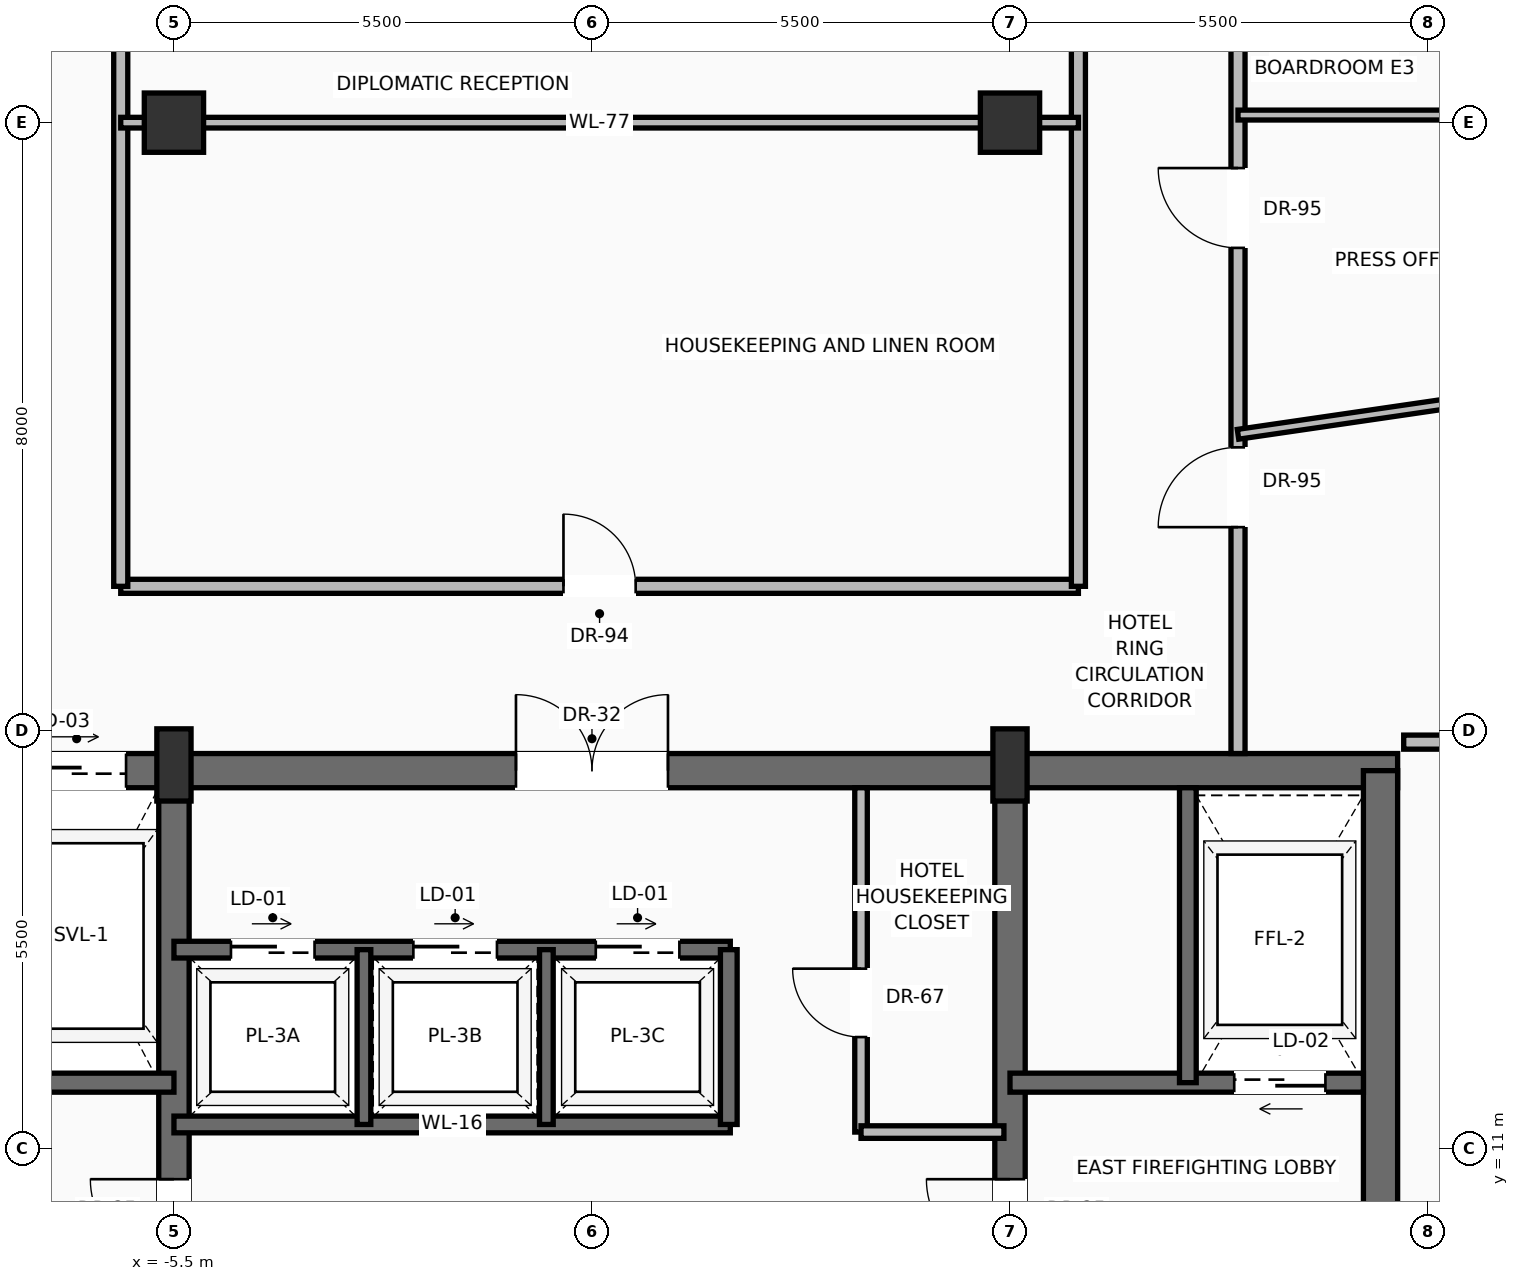
"""IFC4 building model, lengths in metres.
Left out: names, types, materials, properties, quantities, classifications, styles, units other than length and angle.
Written with IfcOpenShell. Run it as: python <this file> out.ifc"""

import sys

from ifc_helpers import new_model, si_unit, direction, frame, frame_2d, origin, origin_2d, place, context, subcontext, project, spatial, rectangle, extrude, source, transform, mapped, element, fill, save


model = new_model("IFC4")
c1 = context("Model", 3, precision=1e-05, world=origin(), true_north=direction((0.0, 1.0)))
c2 = subcontext(c1, "Body", "Model", "MODEL_VIEW")
j1 = project(units=[si_unit("LENGTHUNIT", "METRE"), si_unit("PLANEANGLEUNIT", "RADIAN")], contexts=[c1])
p1 = place(None, origin())
s1 = spatial("IfcSite", under=j1, at=p1, CompositionType="ELEMENT")
p2 = place(p1, origin())
s2 = spatial("IfcBuilding", under=s1, at=p2, CompositionType="ELEMENT")
p3 = place(p2, frame((0.0, 0.0, 262.65)))
s3 = spatial("IfcBuildingStorey", under=s2, at=p3, CompositionType="ELEMENT", Elevation=262.65)
p4 = place(p3, frame((-10.6, 15.975, 0.0), z_axis=(0.0, 0.0, 1.0), x_axis=(1.0, 0.0, 0.0)))
e1 = element("IfcWall", 1, at=p4, inside=s3, PredefinedType="SHEAR", context=c2, shape_type="SweptSolid", body=[
    extrude(rectangle(XDim=21.2, YDim=0.45, at=frame_2d((10.6, 0.0))), origin(), (0.0, 0.0, 1.0), 3.24),
])
p5 = place(p4, frame((3.17, 0.0, 0.0)))
e2 = element("IfcOpeningElement", 2, at=p5, cuts=e1, PredefinedType="OPENING", context=c2, shape_type="SweptSolid", body=[
    extrude(rectangle(XDim=1.3, YDim=2.3, at=frame_2d((0.65, 1.15))), frame((0.0, 0.235, 0.0), z_axis=(0.0, -1.0, 0.0), x_axis=(1.0, 0.0, 0.0)), (0.0, 0.0, 1.0), 0.47),
])
p6 = place(p4, frame((9.6, 0.0, 0.0)))
e3 = element("IfcOpeningElement", 3, at=p6, cuts=e1, PredefinedType="OPENING", context=c2, shape_type="SweptSolid", body=[
    extrude(rectangle(XDim=2.0, YDim=2.4, at=frame_2d((1.0, 1.2))), frame((0.0, 0.235, 0.0), z_axis=(0.0, -1.0, 0.0), x_axis=(1.0, 0.0, 0.0)), (0.0, 0.0, 1.0), 0.47),
])
p7 = place(p3, frame((10.375, 0.625, 0.0), z_axis=(0.0, 0.0, 1.0), x_axis=(0.0, 1.0, 0.0)))
e4 = element("IfcWall", 4, at=p7, inside=s3, PredefinedType="SHEAR", context=c2, shape_type="SweptSolid", body=[
    extrude(rectangle(XDim=15.35, YDim=0.45, at=frame_2d((7.675, 0.0))), origin(), (0.0, 0.0, 1.0), 3.24),
])
p8 = place(p3, frame((-5.5, 0.625, 0.0), z_axis=(0.0, 0.0, 1.0), x_axis=(0.0, 1.0, 0.0)))
e5 = element("IfcWall", 5, at=p8, inside=s3, PredefinedType="SHEAR", context=c2, shape_type="SweptSolid", body=[
    extrude(rectangle(XDim=15.35, YDim=0.4, at=frame_2d((7.675, 0.0))), origin(), (0.0, 0.0, 1.0), 3.24),
])
p9 = place(p8, frame((8.875, 0.0, 0.0)))
e6 = element("IfcOpeningElement", 6, at=p9, cuts=e5, PredefinedType="OPENING", context=c2, shape_type="SweptSolid", body=[
    extrude(rectangle(XDim=1.1, YDim=2.2, at=frame_2d((0.55, 1.1))), frame((0.0, 0.21, 0.0), z_axis=(0.0, -1.0, 0.0), x_axis=(1.0, 0.0, 0.0)), (0.0, 0.0, 1.0), 0.42),
])
p10 = place(p3, frame((5.5, 0.625, 0.0), z_axis=(0.0, 0.0, 1.0), x_axis=(0.0, 1.0, 0.0)))
e7 = element("IfcWall", 7, at=p10, inside=s3, PredefinedType="SHEAR", context=c2, shape_type="SweptSolid", body=[
    extrude(rectangle(XDim=15.35, YDim=0.4, at=frame_2d((7.675, 0.0))), origin(), (0.0, 0.0, 1.0), 3.24),
])
p11 = place(p10, frame((8.875, 0.0, 0.0)))
e8 = element("IfcOpeningElement", 8, at=p11, cuts=e7, PredefinedType="OPENING", context=c2, shape_type="SweptSolid", body=[
    extrude(rectangle(XDim=1.1, YDim=2.2, at=frame_2d((0.55, 1.1))), frame((0.0, 0.21, 0.0), z_axis=(0.0, -1.0, 0.0), x_axis=(1.0, 0.0, 0.0)), (0.0, 0.0, 1.0), 0.42),
])
m1 = source(origin(), c2, "Body", "SweptSolid", [
    extrude(rectangle(XDim=0.45, YDim=0.95, at=origin_2d()), origin(), (0.0, 0.0, 1.0), 3.45),
])
for number, where, z_axis, x_axis in (
    (9, (-5.5, 16.05, 0.0), (0.0, 0.0, 1.0), (1.0, 0.0, 0.0)),
    (10, (5.5, 16.05, 0.0), (0.0, 0.0, 1.0), (1.0, 0.0, 0.0)),
):
    element("IfcColumn", number, at=place(p3, frame(where, z_axis=z_axis, x_axis=x_axis)), inside=s3, PredefinedType="PILASTER", context=c2, shape_type="MappedRepresentation", body=[
        mapped(m1, transform((0.0, 0.0, 0.0), scale=1.0)),
    ])
m2 = source(origin(), c2, "Body", "SweptSolid", [
    extrude(rectangle(XDim=0.78, YDim=0.78, at=origin_2d()), origin(), (0.0, 0.0, 1.0), 3.45),
])
for number, where, z_axis, x_axis in (
    (11, (-5.5, 24.5, 0.0), (0.0, 0.0, 1.0), (1.0, 0.0, 0.0)),
    (12, (5.5, 24.5, 0.0), (0.0, 0.0, 1.0), (1.0, 0.0, 0.0)),
):
    element("IfcColumn", number, at=place(p3, frame(where, z_axis=z_axis, x_axis=x_axis)), inside=s3, PredefinedType="COLUMN", context=c2, shape_type="MappedRepresentation", body=[
        mapped(m2, transform((0.0, 0.0, 0.0), scale=1.0)),
    ])
p12 = place(p3, frame((8.051, 31.865, 0.0), z_axis=(0.0, 0.0, 1.0), x_axis=(0.516203649231, -0.856465873529, 0.0)))
e13 = element("IfcWall", 13, at=p12, inside=s3, PredefinedType="SOLIDWALL", context=c2, shape_type="SweptSolid", body=[
    extrude(rectangle(XDim=19.896, YDim=0.28, at=frame_2d((9.948, 0.0))), origin(), (0.0, 0.0, 1.0), 2.82),
])
p13 = place(p12, frame((4.775, 0.0, 0.0)))
e14 = element("IfcOpeningElement", 14, at=p13, cuts=e13, PredefinedType="OPENING", context=c2, shape_type="SweptSolid", body=[
    extrude(rectangle(XDim=1.6, YDim=2.35, at=frame_2d((0.8, 1.175))), frame((0.0, 0.15, 0.0), z_axis=(0.0, -1.0, 0.0), x_axis=(1.0, 0.0, 0.0)), (0.0, 0.0, 1.0), 0.3),
])
p14 = place(p12, frame((13.529, 0.0, 0.9)))
e15 = element("IfcOpeningElement", 15, at=p14, cuts=e13, PredefinedType="OPENING", context=c2, shape_type="SweptSolid", body=[
    extrude(rectangle(XDim=2.0, YDim=1.75, at=frame_2d((1.0, 0.875))), frame((0.0, 0.15, 0.0), z_axis=(0.0, -1.0, 0.0), x_axis=(1.0, 0.0, 0.0)), (0.0, 0.0, 1.0), 0.3),
])
p15 = place(p3, frame((-5.5, 11.87, 0.0), z_axis=(0.0, 0.0, 1.0), x_axis=(-1.0, 0.0, 0.0)))
e16 = element("IfcWall", 16, at=p15, inside=s3, PredefinedType="SOLIDWALL", context=c2, shape_type="SweptSolid", body=[
    extrude(rectangle(XDim=4.65, YDim=0.25, at=frame_2d((2.325, 0.0))), origin(), (0.0, 0.0, 1.0), 3.24),
])
p16 = place(p15, frame((2.95, 0.0, 0.0)))
e17 = element("IfcOpeningElement", 17, at=p16, cuts=e16, PredefinedType="OPENING", context=c2, shape_type="SweptSolid", body=[
    extrude(rectangle(XDim=1.2, YDim=2.25, at=frame_2d((0.6, 1.125))), frame((0.0, 0.135, 0.0), z_axis=(0.0, -1.0, 0.0), x_axis=(1.0, 0.0, 0.0)), (0.0, 0.0, 1.0), 0.27),
])
p17 = place(p3, frame((10.15, 11.87, 0.0), z_axis=(0.0, 0.0, 1.0), x_axis=(-1.0, 0.0, 0.0)))
e18 = element("IfcWall", 18, at=p17, inside=s3, PredefinedType="SOLIDWALL", context=c2, shape_type="SweptSolid", body=[
    extrude(rectangle(XDim=4.65, YDim=0.25, at=frame_2d((2.325, 0.0))), origin(), (0.0, 0.0, 1.0), 3.24),
])
p18 = place(p17, frame((0.5, 0.0, 0.0)))
e19 = element("IfcOpeningElement", 19, at=p18, cuts=e18, PredefinedType="OPENING", context=c2, shape_type="SweptSolid", body=[
    extrude(rectangle(XDim=1.2, YDim=2.25, at=frame_2d((0.6, 1.125))), frame((0.0, 0.135, 0.0), z_axis=(0.0, -1.0, 0.0), x_axis=(1.0, 0.0, 0.0)), (0.0, 0.0, 1.0), 0.27),
])
p19 = place(p3, frame((7.84, 11.87, 0.0), z_axis=(0.0, 0.0, 1.0), x_axis=(0.0, 1.0, 0.0)))
e20 = element("IfcWall", 20, at=p19, inside=s3, PredefinedType="SOLIDWALL", context=c2, shape_type="SweptSolid", body=[
    extrude(rectangle(XDim=3.88, YDim=0.22, at=frame_2d((1.94, 0.0))), origin(), (0.0, 0.0, 1.0), 3.24),
])
p20 = place(p3, frame((-5.5, 11.32, 0.0), z_axis=(0.0, 0.0, 1.0), x_axis=(1.0, 0.0, 0.0)))
e21 = element("IfcWall", 21, at=p20, inside=s3, PredefinedType="SOLIDWALL", context=c2, shape_type="SweptSolid", body=[
    extrude(rectangle(XDim=7.32, YDim=0.22, at=frame_2d((3.66, 0.0))), origin(), (0.0, 0.0, 1.0), 3.24),
])
p21 = place(p3, frame((-5.5, 13.62, 0.0), z_axis=(0.0, 0.0, 1.0), x_axis=(1.0, 0.0, 0.0)))
e22 = element("IfcWall", 22, at=p21, inside=s3, PredefinedType="SOLIDWALL", context=c2, shape_type="SweptSolid", body=[
    extrude(rectangle(XDim=7.32, YDim=0.22, at=frame_2d((3.66, 0.0))), origin(), (0.0, 0.0, 1.0), 3.24),
])
p22 = place(p21, frame((0.75, 0.0, 0.0)))
e23 = element("IfcOpeningElement", 23, at=p22, cuts=e22, PredefinedType="OPENING", context=c2, shape_type="SweptSolid", body=[
    extrude(rectangle(XDim=1.1, YDim=2.2, at=frame_2d((0.55, 1.1))), frame((0.0, 0.12, 0.0), z_axis=(0.0, -1.0, 0.0), x_axis=(1.0, 0.0, 0.0)), (0.0, 0.0, 1.0), 0.24),
])
p23 = place(p21, frame((3.15, 0.0, 0.0)))
e24 = element("IfcOpeningElement", 24, at=p23, cuts=e22, PredefinedType="OPENING", context=c2, shape_type="SweptSolid", body=[
    extrude(rectangle(XDim=1.1, YDim=2.2, at=frame_2d((0.55, 1.1))), frame((0.0, 0.12, 0.0), z_axis=(0.0, -1.0, 0.0), x_axis=(1.0, 0.0, 0.0)), (0.0, 0.0, 1.0), 0.24),
])
p24 = place(p21, frame((5.55, 0.0, 0.0)))
e25 = element("IfcOpeningElement", 25, at=p24, cuts=e22, PredefinedType="OPENING", context=c2, shape_type="SweptSolid", body=[
    extrude(rectangle(XDim=1.1, YDim=2.2, at=frame_2d((0.55, 1.1))), frame((0.0, 0.12, 0.0), z_axis=(0.0, -1.0, 0.0), x_axis=(1.0, 0.0, 0.0)), (0.0, 0.0, 1.0), 0.24),
])
p25 = place(p3, frame((1.8, 11.32, 0.0), z_axis=(0.0, 0.0, 1.0), x_axis=(0.0, 1.0, 0.0)))
e26 = element("IfcWall", 26, at=p25, inside=s3, PredefinedType="SOLIDWALL", context=c2, shape_type="SweptSolid", body=[
    extrude(rectangle(XDim=2.3, YDim=0.22, at=frame_2d((1.15, 0.0))), origin(), (0.0, 0.0, 1.0), 3.24),
])
for number, where, z_axis, x_axis in (
    (27, (-3.0, 11.32, 0.0), (0.0, 0.0, 1.0), (0.0, 1.0, 0.0)),
    (28, (-0.6, 11.32, 0.0), (0.0, 0.0, 1.0), (0.0, 1.0, 0.0)),
):
    element("IfcWall", number, at=place(p3, frame(where, z_axis=z_axis, x_axis=x_axis)), inside=s3, PredefinedType="SOLIDWALL", context=c2, shape_type="SweptSolid", body=[
        extrude(rectangle(XDim=2.3, YDim=0.18, at=frame_2d((1.15, 0.0))), origin(), (0.0, 0.0, 1.0), 3.24),
    ])
p26 = place(p3, frame((3.54, 11.22, 0.0), z_axis=(0.0, 0.0, 1.0), x_axis=(0.0, 1.0, 0.0)))
e29 = element("IfcWall", 29, at=p26, inside=s3, PredefinedType="PARTITIONING", context=c2, shape_type="SweptSolid", body=[
    extrude(rectangle(XDim=4.53, YDim=0.165, at=frame_2d((2.265, 0.0))), origin(), (0.0, 0.0, 1.0), 3.232),
])
p27 = place(p26, frame((1.25, 0.0, 0.0)))
e30 = element("IfcOpeningElement", 30, at=p27, cuts=e29, PredefinedType="OPENING", context=c2, shape_type="SweptSolid", body=[
    extrude(rectangle(XDim=0.9, YDim=2.1, at=frame_2d((0.45, 1.05))), frame((0.0, 0.093, 0.0), z_axis=(0.0, -1.0, 0.0), x_axis=(1.0, 0.0, 0.0)), (0.0, 0.0, 1.0), 0.185),
])
p28 = place(p3, frame((3.54, 11.22, 0.0), z_axis=(0.0, 0.0, 1.0), x_axis=(1.0, 0.0, 0.0)))
e31 = element("IfcWall", 31, at=p28, inside=s3, PredefinedType="PARTITIONING", context=c2, shape_type="SweptSolid", body=[
    extrude(rectangle(XDim=1.88, YDim=0.165, at=frame_2d((0.94, 0.0))), origin(), (0.0, 0.0, 1.0), 3.232),
])
p29 = place(p3, frame((-6.2, 18.4, 0.0), z_axis=(0.0, 0.0, 1.0), x_axis=(1.0, 0.0, 0.0)))
e32 = element("IfcWall", 32, at=p29, inside=s3, PredefinedType="PARTITIONING", context=c2, shape_type="SweptSolid", body=[
    extrude(rectangle(XDim=12.6, YDim=0.185, at=frame_2d((6.3, 0.0))), origin(), (0.0, 0.0, 1.0), 3.232),
])
p30 = place(p29, frame((5.825, 0.0, 0.0)))
e33 = element("IfcOpeningElement", 33, at=p30, cuts=e32, PredefinedType="OPENING", context=c2, shape_type="SweptSolid", body=[
    extrude(rectangle(XDim=0.95, YDim=2.2, at=frame_2d((0.475, 1.1))), frame((0.0, 0.103, 0.0), z_axis=(0.0, -1.0, 0.0), x_axis=(1.0, 0.0, 0.0)), (0.0, 0.0, 1.0), 0.205),
])
for number, where, z_axis, x_axis in (
    (34, (-6.2, 18.4, 0.0), (0.0, 0.0, 1.0), (0.0, 1.0, 0.0)),
    (35, (6.4, 18.4, 0.0), (0.0, 0.0, 1.0), (0.0, 1.0, 0.0)),
):
    element("IfcWall", number, at=place(p3, frame(where, z_axis=z_axis, x_axis=x_axis)), inside=s3, PredefinedType="PARTITIONING", context=c2, shape_type="SweptSolid", body=[
        extrude(rectangle(XDim=7.9, YDim=0.185, at=frame_2d((3.95, 0.0))), origin(), (0.0, 0.0, 1.0), 3.232),
    ])
p31 = place(p3, frame((8.5, 16.2, 0.0), z_axis=(0.0, 0.0, 1.0), x_axis=(0.0, 1.0, 0.0)))
e36 = element("IfcWall", 36, at=p31, inside=s3, PredefinedType="PARTITIONING", context=c2, shape_type="SweptSolid", body=[
    extrude(rectangle(XDim=12.2, YDim=0.185, at=frame_2d((6.1, 0.0))), origin(), (0.0, 0.0, 1.0), 3.232),
])
p32 = place(p31, frame((2.978, 0.0, 0.0)))
e37 = element("IfcOpeningElement", 37, at=p32, cuts=e36, PredefinedType="OPENING", context=c2, shape_type="SweptSolid", body=[
    extrude(rectangle(XDim=1.05, YDim=2.25, at=frame_2d((0.525, 1.125))), frame((0.0, 0.103, 0.0), z_axis=(0.0, -1.0, 0.0), x_axis=(1.0, 0.0, 0.0)), (0.0, 0.0, 1.0), 0.205),
])
p33 = place(p31, frame((6.653, 0.0, 0.0)))
e38 = element("IfcOpeningElement", 38, at=p33, cuts=e36, PredefinedType="OPENING", context=c2, shape_type="SweptSolid", body=[
    extrude(rectangle(XDim=1.05, YDim=2.25, at=frame_2d((0.525, 1.125))), frame((0.0, 0.103, 0.0), z_axis=(0.0, -1.0, 0.0), x_axis=(1.0, 0.0, 0.0)), (0.0, 0.0, 1.0), 0.205),
])
p34 = place(p31, frame((9.953, 0.0, 0.0)))
e39 = element("IfcOpeningElement", 39, at=p34, cuts=e36, PredefinedType="OPENING", context=c2, shape_type="SweptSolid", body=[
    extrude(rectangle(XDim=1.05, YDim=2.25, at=frame_2d((0.525, 1.125))), frame((0.0, 0.103, 0.0), z_axis=(0.0, -1.0, 0.0), x_axis=(1.0, 0.0, 0.0)), (0.0, 0.0, 1.0), 0.205),
])
p35 = place(p3, frame((-6.2, 24.5, 0.0), z_axis=(0.0, 0.0, 1.0), x_axis=(1.0, 0.0, 0.0)))
e40 = element("IfcWall", 40, at=p35, inside=s3, PredefinedType="PARTITIONING", context=c2, shape_type="SweptSolid", body=[
    extrude(rectangle(XDim=12.6, YDim=0.14, at=frame_2d((6.3, 0.0))), origin(), (0.0, 0.0, 1.0), 2.683),
])
p36 = place(p3, frame((10.68, 16.35, 0.0), z_axis=(0.0, 0.0, 1.0), x_axis=(1.0, 0.0, 0.0)))
e41 = element("IfcWall", 41, at=p36, inside=s3, PredefinedType="PARTITIONING", context=c2, shape_type="SweptSolid", body=[
    extrude(rectangle(XDim=6.874, YDim=0.185, at=frame_2d((3.437, 0.0))), origin(), (0.0, 0.0, 1.0), 3.232),
])
p37 = place(p36, frame((1.983, 0.0, 0.0)))
e42 = element("IfcOpeningElement", 42, at=p37, cuts=e41, PredefinedType="OPENING", context=c2, shape_type="SweptSolid", body=[
    extrude(rectangle(XDim=1.05, YDim=2.25, at=frame_2d((0.525, 1.125))), frame((0.0, 0.103, 0.0), z_axis=(0.0, -1.0, 0.0), x_axis=(1.0, 0.0, 0.0)), (0.0, 0.0, 1.0), 0.205),
])
p38 = place(p3, frame((8.5, 20.4, 0.0), z_axis=(0.0, 0.0, 1.0), x_axis=(0.989507543015, 0.144481217869, 0.0)))
e43 = element("IfcWall", 43, at=p38, inside=s3, PredefinedType="PARTITIONING", context=c2, shape_type="SweptSolid", body=[
    extrude(rectangle(XDim=6.142, YDim=0.13, at=frame_2d((3.071, 0.0))), origin(), (0.0, 0.0, 1.0), 3.232),
])
p39 = place(p3, frame((8.5, 24.6, 0.0), z_axis=(0.0, 0.0, 1.0), x_axis=(1.0, 0.0, 0.0)))
e44 = element("IfcWall", 44, at=p39, inside=s3, PredefinedType="PARTITIONING", context=c2, shape_type="SweptSolid", body=[
    extrude(rectangle(XDim=4.081, YDim=0.13, at=frame_2d((2.041, 0.0))), origin(), (0.0, 0.0, 1.0), 2.683),
])
m3 = source(origin(), c2, "Body", "SweptSolid", [
    extrude(rectangle(XDim=1.1, YDim=2.2, at=frame_2d((0.55, 1.1))), frame((0.0, 0.025, 0.0), z_axis=(0.0, -1.0, 0.0), x_axis=(1.0, 0.0, 0.0)), (0.0, 0.0, 1.0), 0.05),
])
p40 = place(p9, origin())
e45 = element("IfcDoor", 45, at=p40, inside=s3, OperationType="SINGLE_SWING_RIGHT", PredefinedType="DOOR", context=c2, shape_type="MappedRepresentation", body=[
    mapped(m3, transform((0.0, 0.0, 0.0), scale=1.0)),
])
fill(e6, e45)
m4 = source(origin(), c2, "Body", "SweptSolid", [
    extrude(rectangle(XDim=1.3, YDim=2.3, at=frame_2d((0.65, 1.15))), frame((0.0, 0.025, 0.0), z_axis=(0.0, -1.0, 0.0), x_axis=(1.0, 0.0, 0.0)), (0.0, 0.0, 1.0), 0.05),
])
p41 = place(p5, origin())
e46 = element("IfcDoor", 46, at=p41, inside=s3, OperationType="SLIDING_TO_RIGHT", PredefinedType="DOOR", context=c2, shape_type="MappedRepresentation", body=[
    mapped(m4, transform((0.0, 0.0, 0.0), scale=1.0)),
])
fill(e2, e46)
p42 = place(p11, origin())
e47 = element("IfcDoor", 47, at=p42, inside=s3, OperationType="SINGLE_SWING_RIGHT", PredefinedType="DOOR", context=c2, shape_type="MappedRepresentation", body=[
    mapped(m3, transform((0.0, 0.0, 0.0), scale=1.0)),
])
fill(e8, e47)
m5 = source(origin(), c2, "Body", "SweptSolid", [
    extrude(rectangle(XDim=1.2, YDim=2.25, at=frame_2d((0.6, 1.125))), frame((0.0, 0.025, 0.0), z_axis=(0.0, -1.0, 0.0), x_axis=(1.0, 0.0, 0.0)), (0.0, 0.0, 1.0), 0.05),
])
p43 = place(p18, origin())
e48 = element("IfcDoor", 48, at=p43, inside=s3, OperationType="SLIDING_TO_RIGHT", PredefinedType="DOOR", context=c2, shape_type="MappedRepresentation", body=[
    mapped(m5, transform((0.0, 0.0, 0.0), scale=1.0)),
])
fill(e19, e48)
m6 = source(origin(), c2, "Body", "SweptSolid", [
    extrude(rectangle(XDim=2.0, YDim=2.4, at=frame_2d((1.0, 1.2))), frame((0.0, 0.025, 0.0), z_axis=(0.0, -1.0, 0.0), x_axis=(1.0, 0.0, 0.0)), (0.0, 0.0, 1.0), 0.05),
])
p44 = place(p6, origin())
e49 = element("IfcDoor", 49, at=p44, inside=s3, OperationType="DOUBLE_DOOR_SINGLE_SWING", PredefinedType="DOOR", context=c2, shape_type="MappedRepresentation", body=[
    mapped(m6, transform((0.0, 0.0, 0.0), scale=1.0)),
])
fill(e3, e49)
m7 = source(origin(), c2, "Body", "SweptSolid", [
    extrude(rectangle(XDim=1.1, YDim=2.2, at=frame_2d((0.55, 1.1))), frame((0.0, 0.025, 0.0), z_axis=(0.0, -1.0, 0.0), x_axis=(1.0, 0.0, 0.0)), (0.0, 0.0, 1.0), 0.05),
])
p45 = place(p22, origin())
e50 = element("IfcDoor", 50, at=p45, inside=s3, OperationType="SLIDING_TO_RIGHT", PredefinedType="DOOR", context=c2, shape_type="MappedRepresentation", body=[
    mapped(m7, transform((0.0, 0.0, 0.0), scale=1.0)),
])
fill(e23, e50)
p46 = place(p23, origin())
e51 = element("IfcDoor", 51, at=p46, inside=s3, OperationType="SLIDING_TO_RIGHT", PredefinedType="DOOR", context=c2, shape_type="MappedRepresentation", body=[
    mapped(m7, transform((0.0, 0.0, 0.0), scale=1.0)),
])
fill(e24, e51)
p47 = place(p24, origin())
e52 = element("IfcDoor", 52, at=p47, inside=s3, OperationType="SLIDING_TO_RIGHT", PredefinedType="DOOR", context=c2, shape_type="MappedRepresentation", body=[
    mapped(m7, transform((0.0, 0.0, 0.0), scale=1.0)),
])
fill(e25, e52)
m8 = source(origin(), c2, "Body", "SweptSolid", [
    extrude(rectangle(XDim=0.9, YDim=2.1, at=frame_2d((0.45, 1.05))), frame((0.0, 0.025, 0.0), z_axis=(0.0, -1.0, 0.0), x_axis=(1.0, 0.0, 0.0)), (0.0, 0.0, 1.0), 0.05),
])
p48 = place(p27, origin())
e53 = element("IfcDoor", 53, at=p48, inside=s3, OperationType="SINGLE_SWING_RIGHT", PredefinedType="DOOR", context=c2, shape_type="MappedRepresentation", body=[
    mapped(m8, transform((0.0, 0.0, 0.0), scale=1.0)),
])
fill(e30, e53)
m9 = source(origin(), c2, "Body", "SweptSolid", [
    extrude(rectangle(XDim=0.95, YDim=2.2, at=frame_2d((0.475, 1.1))), frame((0.0, 0.025, 0.0), z_axis=(0.0, -1.0, 0.0), x_axis=(1.0, 0.0, 0.0)), (0.0, 0.0, 1.0), 0.05),
])
p49 = place(p30, origin())
e54 = element("IfcDoor", 54, at=p49, inside=s3, OperationType="SINGLE_SWING_LEFT", PredefinedType="DOOR", context=c2, shape_type="MappedRepresentation", body=[
    mapped(m9, transform((0.0, 0.0, 0.0), scale=1.0)),
])
fill(e33, e54)
m10 = source(origin(), c2, "Body", "SweptSolid", [
    extrude(rectangle(XDim=1.05, YDim=2.25, at=frame_2d((0.525, 1.125))), frame((0.0, 0.025, 0.0), z_axis=(0.0, -1.0, 0.0), x_axis=(1.0, 0.0, 0.0)), (0.0, 0.0, 1.0), 0.05),
])
p50 = place(p32, origin())
e55 = element("IfcDoor", 55, at=p50, inside=s3, OperationType="SINGLE_SWING_LEFT", PredefinedType="DOOR", context=c2, shape_type="MappedRepresentation", body=[
    mapped(m10, transform((0.0, 0.0, 0.0), scale=1.0)),
])
fill(e37, e55)
p51 = place(p33, origin())
e56 = element("IfcDoor", 56, at=p51, inside=s3, OperationType="SINGLE_SWING_RIGHT", PredefinedType="DOOR", context=c2, shape_type="MappedRepresentation", body=[
    mapped(m10, transform((0.0, 0.0, 0.0), scale=1.0)),
])
fill(e38, e56)
save(model, sys.argv[1])
